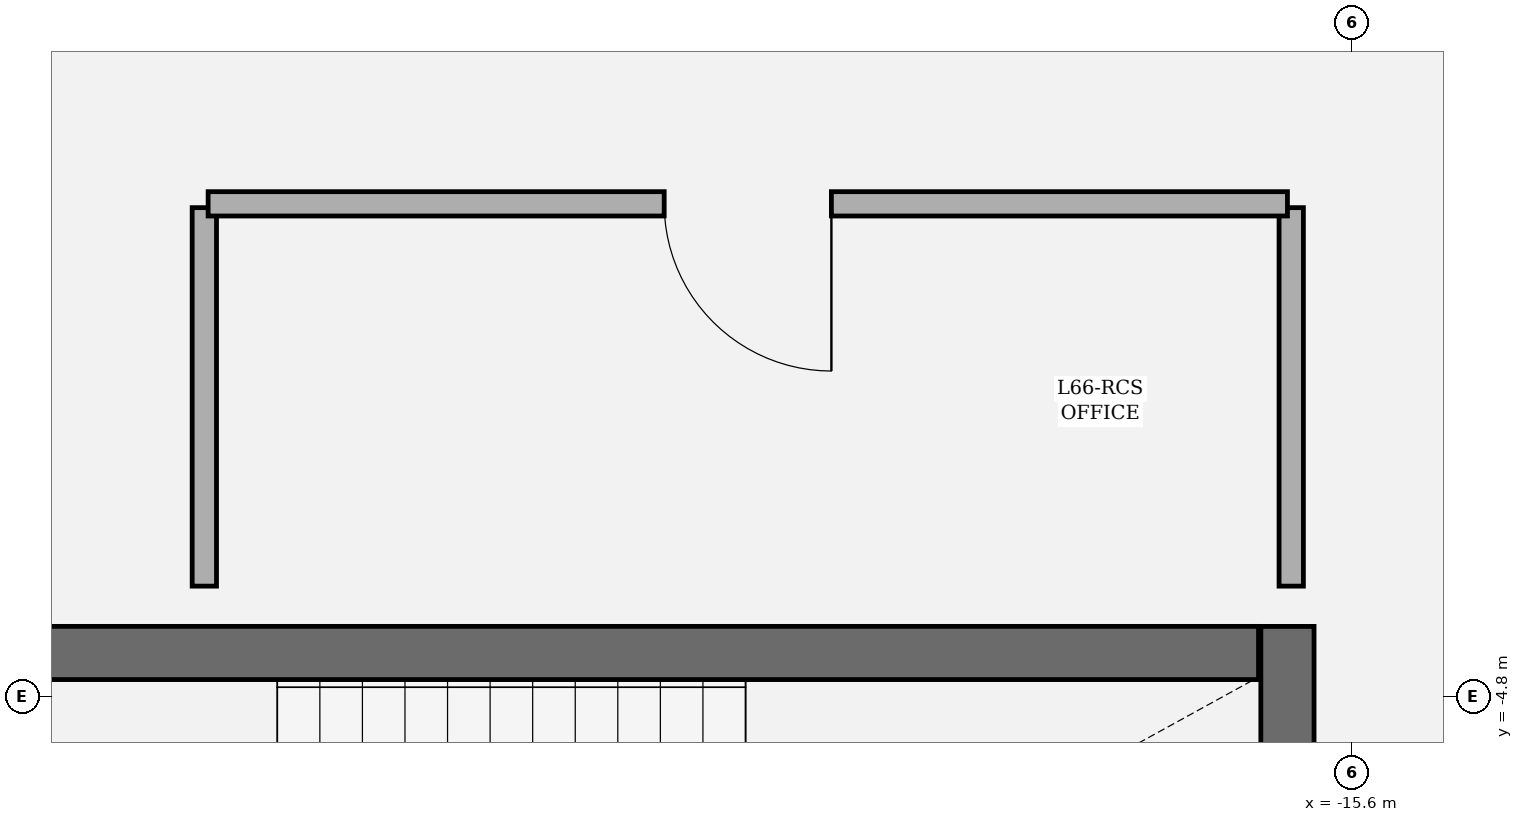
"""IFC4 building model, lengths in metres.
Left out: names, types, materials, properties, quantities, classifications, styles, units other than length and angle.
Written with IfcOpenShell. Run it as: python <this file> out.ifc"""

import sys

from ifc_helpers import new_model, si_unit, direction, frame, frame_2d, origin, place, context, subcontext, project, spatial, rectangle, extrude, element, fill, save


model = new_model("IFC4")
c1 = context("Model", 3, precision=1e-05, world=origin(), true_north=direction((0.0, 1.0)))
c2 = subcontext(c1, "Body", "Model", "MODEL_VIEW")
j1 = project(units=[si_unit("LENGTHUNIT", "METRE"), si_unit("PLANEANGLEUNIT", "RADIAN")], contexts=[c1])
p1 = place(None, origin())
s1 = spatial("IfcSite", under=j1, at=p1, CompositionType="ELEMENT")
p2 = place(p1, origin())
s2 = spatial("IfcBuilding", under=s1, at=p2, CompositionType="ELEMENT")
p3 = place(p2, frame((0.0, 0.0, 285.0)))
s3 = spatial("IfcBuildingStorey", under=s2, at=p3, CompositionType="ELEMENT", Elevation=285.0)
p4 = place(p3, frame((-16.025, -8.55, 0.0), z_axis=(0.0, 0.0, 1.0), x_axis=(0.0, 1.0, 0.0)))
e1 = element("IfcWall", 1, at=p4, inside=s3, PredefinedType="SHEAR", context=c2, shape_type="SweptSolid", body=[
    extrude(rectangle(XDim=4.21, YDim=0.35, at=frame_2d((2.105, 0.0))), origin(), (0.0, 0.0, 1.0), 3.91),
])
p5 = place(p3, frame((-16.215, -4.515, 0.0), z_axis=(0.0, 0.0, 1.0), x_axis=(-1.0, 0.0, 0.0)))
e2 = element("IfcWall", 2, at=p5, inside=s3, PredefinedType="SHEAR", context=c2, shape_type="SweptSolid", body=[
    extrude(rectangle(XDim=8.12, YDim=0.35, at=frame_2d((4.06, 0.0))), origin(), (0.0, 0.0, 1.0), 3.91),
])
for number, where, z_axis, x_axis in (
    (3, (-23.15, -1.585, 0.0), (0.0, 0.0, 1.0), (0.0, -1.0, 0.0)),
    (4, (-16.0, -4.075, 0.0), (0.0, 0.0, 1.0), (0.0, 1.0, 0.0)),
):
    element("IfcWall", number, at=place(p3, frame(where, z_axis=z_axis, x_axis=x_axis)), inside=s3, PredefinedType="PARTITIONING", context=c2, shape_type="SweptSolid", body=[
        extrude(rectangle(XDim=2.49, YDim=0.16, at=frame_2d((1.245, 0.0))), origin(), (0.0, 0.0, 1.0), 3.91),
    ])
p6 = place(p3, frame((-16.025, -1.56, 0.0), z_axis=(0.0, 0.0, 1.0), x_axis=(-1.0, 0.0, 0.0)))
e5 = element("IfcWall", 5, at=p6, inside=s3, PredefinedType="PARTITIONING", context=c2, shape_type="SweptSolid", body=[
    extrude(rectangle(XDim=7.1, YDim=0.16, at=frame_2d((3.55, 0.0))), origin(), (0.0, 0.0, 1.0), 3.91),
])
p7 = place(p6, frame((3.0, 0.0, 0.0)))
e6 = element("IfcOpeningElement", 6, at=p7, cuts=e5, PredefinedType="OPENING", context=c2, shape_type="SweptSolid", body=[
    extrude(rectangle(XDim=1.1, YDim=2.15, at=frame_2d((0.55, 1.075))), frame((0.0, 0.09, 0.0), z_axis=(0.0, -1.0, 0.0), x_axis=(1.0, 0.0, 0.0)), (0.0, 0.0, 1.0), 0.18),
])
p8 = place(p7, origin())
e7 = element("IfcDoor", 7, at=p8, inside=s3, OperationType="SINGLE_SWING_LEFT", PredefinedType="DOOR", context=c2, shape_type="SweptSolid", body=[
    extrude(rectangle(XDim=1.1, YDim=2.15, at=frame_2d((0.55, 1.075))), frame((0.0, 0.025, 0.0), z_axis=(0.0, -1.0, 0.0), x_axis=(1.0, 0.0, 0.0)), (0.0, 0.0, 1.0), 0.05),
])
fill(e6, e7)
save(model, sys.argv[1])
